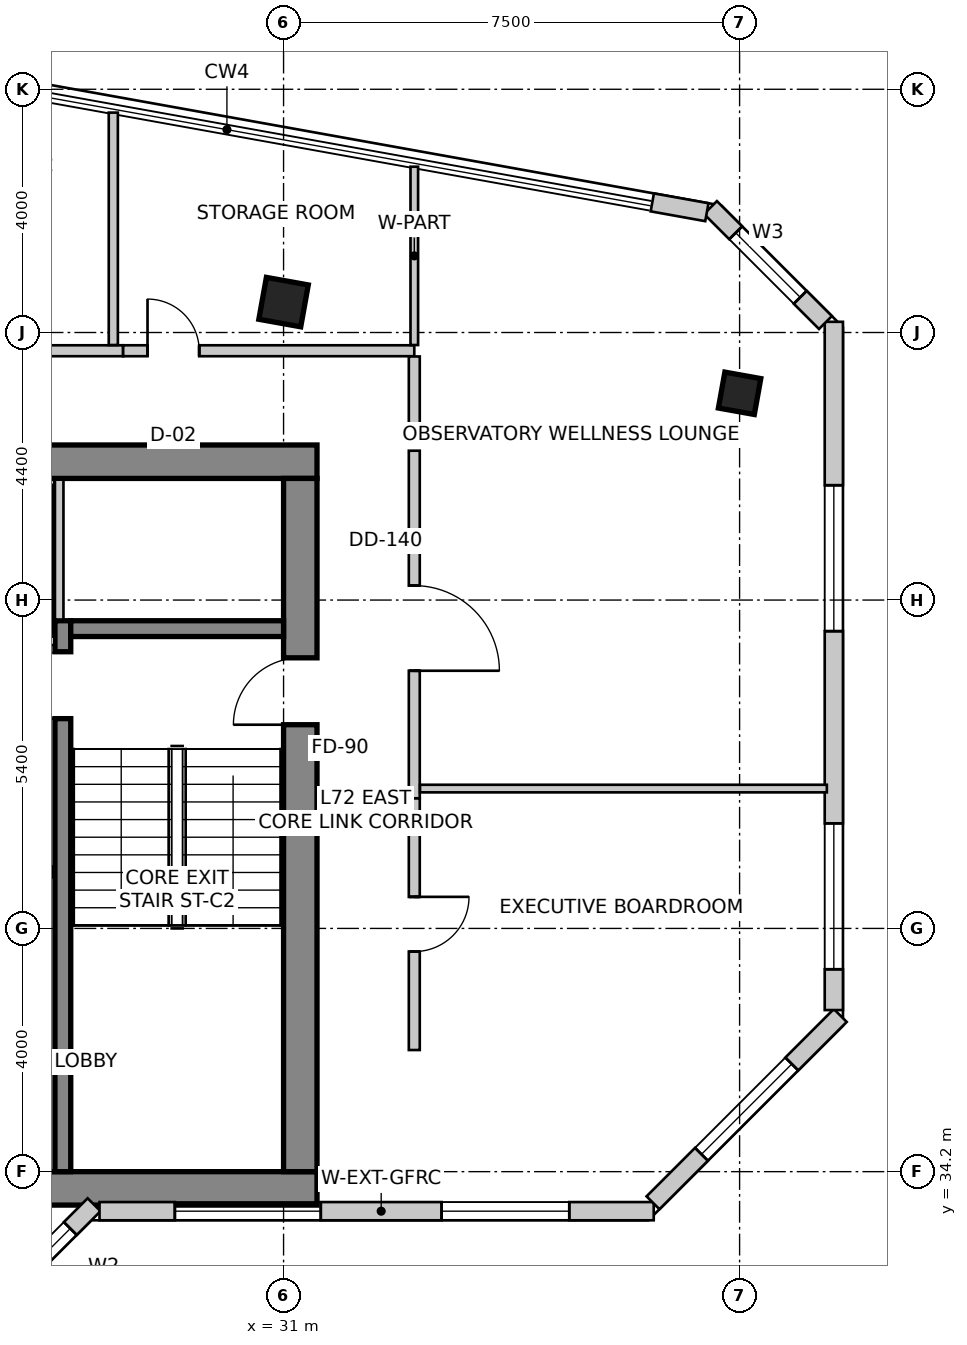
"""IFC4 building model, lengths in metres.
Left out: names, types, materials, properties, quantities, classifications, styles, units other than length and angle.
Written with IfcOpenShell. Run it as: python <this file> out.ifc"""

import sys

from ifc_helpers import new_model, si_unit, direction, frame, frame_2d, origin, origin_2d, place, context, subcontext, project, spatial, rectangle, extrude, source, transform, mapped, element, fill, save


model = new_model("IFC4")
c1 = context("Model", 3, precision=1e-05, world=origin(), true_north=direction((0.0, 1.0)))
c2 = subcontext(c1, "Body", "Model", "MODEL_VIEW")
j1 = project(units=[si_unit("LENGTHUNIT", "METRE"), si_unit("PLANEANGLEUNIT", "RADIAN")], contexts=[c1])
p1 = place(None, origin())
s1 = spatial("IfcSite", under=j1, at=p1, CompositionType="ELEMENT")
p2 = place(p1, origin())
s2 = spatial("IfcBuilding", under=s1, at=p2, CompositionType="ELEMENT")
p3 = place(p2, frame((0.0, 0.0, 281.7)))
s3 = spatial("IfcBuildingStorey", under=s2, at=p3, CompositionType="ELEMENT", Elevation=281.7)
p4 = place(p3, frame((16.05, 45.875, 0.0), z_axis=(0.0, 0.0, 1.0), x_axis=(1.0, 0.0, 0.0)))
e1 = element("IfcWall", 1, at=p4, inside=s3, PredefinedType="SHEAR", context=c2, shape_type="SweptSolid", body=[
    extrude(rectangle(XDim=15.5, YDim=0.55, at=frame_2d((7.75, 0.0))), origin(), (0.0, 0.0, 1.0), 3.6),
])
p5 = place(p3, frame((16.05, 33.925, 0.0), z_axis=(0.0, 0.0, 1.0), x_axis=(1.0, 0.0, 0.0)))
e2 = element("IfcWall", 2, at=p5, inside=s3, PredefinedType="SHEAR", context=c2, shape_type="SweptSolid", body=[
    extrude(rectangle(XDim=15.5, YDim=0.55, at=frame_2d((7.75, 0.0))), origin(), (0.0, 0.0, 1.0), 3.6),
])
m1 = source(origin(), c2, "Body", "SweptSolid", [
    extrude(rectangle(XDim=1.1, YDim=2.15, at=frame_2d((0.55, 1.075))), frame((0.0, 0.285, 0.0), z_axis=(0.0, -1.0, 0.0), x_axis=(1.0, 0.0, 0.0)), (0.0, 0.0, 1.0), 0.57),
])
p6 = place(p5, frame((9.98, 0.0, 0.0)))
e3 = element("IfcOpeningElement", 3, at=p6, cuts=e2, PredefinedType="OPENING", context=c2, shape_type="MappedRepresentation", body=[
    mapped(m1, transform((0.0, 0.0, 0.0), scale=1.0)),
])
p7 = place(p3, frame((31.275, 34.2, 0.0), z_axis=(0.0, 0.0, 1.0), x_axis=(0.0, 1.0, 0.0)))
e4 = element("IfcWall", 4, at=p7, inside=s3, PredefinedType="SHEAR", context=c2, shape_type="SweptSolid", body=[
    extrude(rectangle(XDim=11.4, YDim=0.55, at=frame_2d((5.7, 0.0))), origin(), (0.0, 0.0, 1.0), 3.6),
])
p8 = place(p7, frame((7.35, 0.0, 0.0)))
e5 = element("IfcOpeningElement", 5, at=p8, cuts=e4, PredefinedType="OPENING", context=c2, shape_type="MappedRepresentation", body=[
    mapped(m1, transform((0.0, 0.0, 0.0), scale=1.0)),
])
p9 = place(p3, frame((27.37, 34.2, 0.0), z_axis=(0.0, 0.0, 1.0), x_axis=(0.0, 1.0, 0.0)))
e6 = element("IfcWall", 6, at=p9, inside=s3, PredefinedType="SHEAR", context=c2, shape_type="SweptSolid", body=[
    extrude(rectangle(XDim=9.06, YDim=0.26, at=frame_2d((4.53, 0.0))), origin(), (0.0, 0.0, 1.0), 3.6),
])
m2 = source(origin(), c2, "Body", "SweptSolid", [
    extrude(rectangle(XDim=1.1, YDim=2.15, at=frame_2d((0.55, 1.075))), frame((0.0, 0.14, 0.0), z_axis=(0.0, -1.0, 0.0), x_axis=(1.0, 0.0, 0.0)), (0.0, 0.0, 1.0), 0.28),
])
p10 = place(p9, frame((7.45, 0.0, 0.0)))
e7 = element("IfcOpeningElement", 7, at=p10, cuts=e6, PredefinedType="OPENING", context=c2, shape_type="MappedRepresentation", body=[
    mapped(m2, transform((0.0, 0.0, 0.0), scale=1.0)),
])
p11 = place(p3, frame((27.5, 43.13, 0.0), z_axis=(0.0, 0.0, 1.0), x_axis=(1.0, 0.0, 0.0)))
e8 = element("IfcWall", 8, at=p11, inside=s3, PredefinedType="SHEAR", context=c2, shape_type="SweptSolid", body=[
    extrude(rectangle(XDim=3.5, YDim=0.26, at=frame_2d((1.75, 0.0))), origin(), (0.0, 0.0, 1.0), 3.6),
])
m3 = source(origin(), c2, "Body", "SweptSolid", [
    extrude(rectangle(XDim=0.7, YDim=0.7, at=origin_2d()), origin(), (0.0, 0.0, 1.0), 3.6),
])
p12 = place(p3, frame((31.0, 48.5, 0.0), z_axis=(0.0, 0.0, 1.0), x_axis=(0.984195607969, -0.17708474032, 0.0)))
e9 = element("IfcColumn", 9, at=p12, inside=s3, PredefinedType="COLUMN", context=c2, shape_type="MappedRepresentation", body=[
    mapped(m3, transform((0.0, 0.0, 0.0), scale=1.0)),
])
m4 = source(origin(), c2, "Body", "SweptSolid", [
    extrude(rectangle(XDim=0.6, YDim=0.6, at=origin_2d()), origin(), (0.0, 0.0, 1.0), 3.6),
])
p13 = place(p3, frame((38.5, 47.0, 0.0), z_axis=(0.0, 0.0, 1.0), x_axis=(0.984195607969, -0.17708474032, 0.0)))
e10 = element("IfcColumn", 10, at=p13, inside=s3, PredefinedType="COLUMN", context=c2, shape_type="MappedRepresentation", body=[
    mapped(m4, transform((0.0, 0.0, 0.0), scale=1.0)),
])
p14 = place(p3, frame((25.828, 31.6, 0.0), z_axis=(0.0, 0.0, 1.0), x_axis=(0.707106781187, 0.707106781187, 0.0)))
e11 = element("IfcWall", 11, at=p14, inside=s3, PredefinedType="SOLIDWALL", context=c2, shape_type="SweptSolid", body=[
    extrude(rectangle(XDim=2.907, YDim=0.3, at=frame_2d((1.454, 0.0))), origin(), (0.0, 0.0, 1.0), 3.35),
])
m5 = source(origin(), c2, "Body", "SweptSolid", [
    extrude(rectangle(XDim=1.8, YDim=2.1, at=frame_2d((0.9, 1.05))), frame((0.0, 0.16, 0.0), z_axis=(0.0, -1.0, 0.0), x_axis=(1.0, 0.0, 0.0)), (0.0, 0.0, 1.0), 0.32),
])
p15 = place(p14, frame((0.554, 0.0, 0.85)))
e12 = element("IfcOpeningElement", 12, at=p15, cuts=e11, PredefinedType="OPENING", context=c2, shape_type="MappedRepresentation", body=[
    mapped(m5, transform((0.0, 0.0, 0.0), scale=1.0)),
])
p16 = place(p3, frame((27.973, 33.55, 0.0), z_axis=(0.0, 0.0, 1.0), x_axis=(1.0, 0.0, 0.0)))
e13 = element("IfcWall", 13, at=p16, inside=s3, PredefinedType="SOLIDWALL", context=c2, shape_type="SweptSolid", body=[
    extrude(rectangle(XDim=9.115, YDim=0.3, at=frame_2d((4.558, 0.0))), origin(), (0.0, 0.0, 1.0), 3.35),
])
m6 = source(origin(), c2, "Body", "SweptSolid", [
    extrude(rectangle(XDim=2.4, YDim=2.2, at=frame_2d((1.2, 1.1))), frame((0.0, 0.16, 0.0), z_axis=(0.0, -1.0, 0.0), x_axis=(1.0, 0.0, 0.0)), (0.0, 0.0, 1.0), 0.32),
])
p17 = place(p16, frame((1.239, 0.0, 0.85)))
e14 = element("IfcOpeningElement", 14, at=p17, cuts=e13, PredefinedType="OPENING", context=c2, shape_type="MappedRepresentation", body=[
    mapped(m6, transform((0.0, 0.0, 0.0), scale=1.0)),
])
m7 = source(origin(), c2, "Body", "SweptSolid", [
    extrude(rectangle(XDim=2.1, YDim=2.0, at=frame_2d((1.05, 1.0))), frame((0.0, 0.16, 0.0), z_axis=(0.0, -1.0, 0.0), x_axis=(1.0, 0.0, 0.0)), (0.0, 0.0, 1.0), 0.32),
])
p18 = place(p16, frame((5.626, 0.0, 0.85)))
e15 = element("IfcOpeningElement", 15, at=p18, cuts=e13, PredefinedType="OPENING", context=c2, shape_type="MappedRepresentation", body=[
    mapped(m7, transform((0.0, 0.0, 0.0), scale=1.0)),
])
p19 = place(p3, frame((37.076, 33.688, 0.0), z_axis=(0.0, 0.0, 1.0), x_axis=(0.707078757535, 0.707134803727, 0.0)))
e16 = element("IfcWall", 16, at=p19, inside=s3, PredefinedType="SOLIDWALL", context=c2, shape_type="SweptSolid", body=[
    extrude(rectangle(XDim=4.356, YDim=0.3, at=frame_2d((2.178, 0.0))), origin(), (0.0, 0.0, 1.0), 3.35),
])
p20 = place(p19, frame((1.128, 0.0, 0.85)))
e17 = element("IfcOpeningElement", 17, at=p20, cuts=e16, PredefinedType="OPENING", context=c2, shape_type="MappedRepresentation", body=[
    mapped(m7, transform((0.0, 0.0, 0.0), scale=1.0)),
])
p21 = place(p3, frame((40.05, 36.857, 0.0), z_axis=(0.0, 0.0, 1.0), x_axis=(0.0, 1.0, 0.0)))
e18 = element("IfcWall", 18, at=p21, inside=s3, PredefinedType="SOLIDWALL", context=c2, shape_type="SweptSolid", body=[
    extrude(rectangle(XDim=11.318, YDim=0.3, at=frame_2d((5.659, 0.0))), origin(), (0.0, 0.0, 1.0), 3.35),
])
p22 = place(p21, frame((0.671, 0.0, 0.85)))
e19 = element("IfcOpeningElement", 19, at=p22, cuts=e18, PredefinedType="OPENING", context=c2, shape_type="MappedRepresentation", body=[
    mapped(m6, transform((0.0, 0.0, 0.0), scale=1.0)),
])
p23 = place(p21, frame((6.231, 0.0, 0.85)))
e20 = element("IfcOpeningElement", 20, at=p23, cuts=e18, PredefinedType="OPENING", context=c2, shape_type="MappedRepresentation", body=[
    mapped(m6, transform((0.0, 0.0, 0.0), scale=1.0)),
])
p24 = place(p3, frame((39.912, 48.164, 0.0), z_axis=(0.0, 0.0, 1.0), x_axis=(-0.70715242601, 0.707061133417, 0.0)))
e21 = element("IfcWall", 21, at=p24, inside=s3, PredefinedType="SOLIDWALL", context=c2, shape_type="SweptSolid", body=[
    extrude(rectangle(XDim=2.674, YDim=0.3, at=frame_2d((1.337, 0.0))), origin(), (0.0, 0.0, 1.0), 3.35),
])
m8 = source(origin(), c2, "Body", "SweptSolid", [
    extrude(rectangle(XDim=1.5, YDim=1.8, at=frame_2d((0.75, 0.9))), frame((0.0, 0.16, 0.0), z_axis=(0.0, -1.0, 0.0), x_axis=(1.0, 0.0, 0.0)), (0.0, 0.0, 1.0), 0.32),
])
p25 = place(p24, frame((0.587, 0.0, 0.85)))
e22 = element("IfcOpeningElement", 22, at=p25, cuts=e21, PredefinedType="OPENING", context=c2, shape_type="MappedRepresentation", body=[
    mapped(m8, transform((0.0, 0.0, 0.0), scale=1.0)),
])
p26 = place(p3, frame((37.962, 49.979, 0.0), z_axis=(0.0, 0.0, 1.0), x_axis=(-0.984215051171, 0.176976645491, 0.0)))
e23 = element("IfcWall", 23, at=p26, inside=s3, PredefinedType="SOLIDWALL", context=c2, shape_type="SweptSolid", body=[
    extrude(rectangle(XDim=0.912, YDim=0.3, at=frame_2d((0.456, 0.0))), origin(), (0.0, 0.0, 1.0), 3.35),
])
p27 = place(p3, frame((20.37, 42.93, 0.0), z_axis=(0.0, 0.0, 1.0), x_axis=(1.0, 0.0, 0.0)))
e24 = element("IfcWall", 24, at=p27, inside=s3, PredefinedType="SOLIDWALL", context=c2, shape_type="SweptSolid", body=[
    extrude(rectangle(XDim=6.86, YDim=0.14, at=frame_2d((3.43, 0.0))), origin(), (0.0, 0.0, 1.0), 3.35),
])
m9 = source(origin(), c2, "Body", "SweptSolid", [
    extrude(rectangle(XDim=1.1, YDim=2.15, at=frame_2d((0.55, 1.075))), frame((0.0, 0.08, 0.0), z_axis=(0.0, -1.0, 0.0), x_axis=(1.0, 0.0, 0.0)), (0.0, 0.0, 1.0), 0.16),
])
p28 = place(p27, frame((0.5, 0.0, 0.0)))
e25 = element("IfcOpeningElement", 25, at=p28, cuts=e24, PredefinedType="OPENING", context=c2, shape_type="MappedRepresentation", body=[
    mapped(m9, transform((0.0, 0.0, 0.0), scale=1.0)),
])
p29 = place(p27, frame((2.7, 0.0, 0.0)))
e26 = element("IfcOpeningElement", 26, at=p29, cuts=e24, PredefinedType="OPENING", context=c2, shape_type="MappedRepresentation", body=[
    mapped(m9, transform((0.0, 0.0, 0.0), scale=1.0)),
])
p30 = place(p27, frame((5.1, 0.0, 0.0)))
e27 = element("IfcOpeningElement", 27, at=p30, cuts=e24, PredefinedType="OPENING", context=c2, shape_type="MappedRepresentation", body=[
    mapped(m9, transform((0.0, 0.0, 0.0), scale=1.0)),
])
p31 = place(p3, frame((27.31, 43.28, 0.0), z_axis=(0.0, 0.0, 1.0), x_axis=(0.0, 1.0, 0.0)))
e28 = element("IfcWall", 28, at=p31, inside=s3, PredefinedType="SOLIDWALL", context=c2, shape_type="SweptSolid", body=[
    extrude(rectangle(XDim=2.3, YDim=0.14, at=frame_2d((1.15, 0.0))), origin(), (0.0, 0.0, 1.0), 3.35),
])
p32 = place(p3, frame((24.162, 47.7, 0.0), z_axis=(0.0, 0.0, 1.0), x_axis=(1.0, 0.0, 0.0)))
e29 = element("IfcWall", 29, at=p32, inside=s3, PredefinedType="PARTITIONING", context=c2, shape_type="SweptSolid", body=[
    extrude(rectangle(XDim=4.198, YDim=0.18, at=frame_2d((2.099, 0.0))), origin(), (0.0, 0.0, 1.0), 3.35),
])
m10 = source(origin(), c2, "Body", "SweptSolid", [
    extrude(rectangle(XDim=0.85, YDim=2.15, at=frame_2d((0.425, 1.075))), frame((0.0, 0.1, 0.0), z_axis=(0.0, -1.0, 0.0), x_axis=(1.0, 0.0, 0.0)), (0.0, 0.0, 1.0), 0.2),
])
p33 = place(p32, frame((1.613, 0.0, 0.0)))
e30 = element("IfcOpeningElement", 30, at=p33, cuts=e29, PredefinedType="OPENING", context=c2, shape_type="MappedRepresentation", body=[
    mapped(m10, transform((0.0, 0.0, 0.0), scale=1.0)),
])
p34 = place(p3, frame((28.362, 47.7, 0.0), z_axis=(0.0, 0.0, 1.0), x_axis=(1.0, 0.0, 0.0)))
e31 = element("IfcWall", 31, at=p34, inside=s3, PredefinedType="PARTITIONING", context=c2, shape_type="SweptSolid", body=[
    extrude(rectangle(XDim=4.788, YDim=0.18, at=frame_2d((2.394, 0.0))), origin(), (0.0, 0.0, 1.0), 2.788),
])
p35 = place(p34, frame((0.401, 0.0, 0.0)))
e32 = element("IfcOpeningElement", 32, at=p35, cuts=e31, PredefinedType="OPENING", context=c2, shape_type="MappedRepresentation", body=[
    mapped(m10, transform((0.0, 0.0, 0.0), scale=1.0)),
])
p36 = place(p3, frame((33.15, 47.606, 0.0), z_axis=(0.0, 0.0, 1.0), x_axis=(0.0, -1.0, 0.0)))
e33 = element("IfcWall", 33, at=p36, inside=s3, PredefinedType="PARTITIONING", context=c2, shape_type="SweptSolid", body=[
    extrude(rectangle(XDim=1.456, YDim=0.18, at=frame_2d((0.728, 0.0))), origin(), (0.0, 0.0, 1.0), 3.35),
])
p37 = place(p3, frame((33.15, 46.056, 0.0), z_axis=(0.0, 0.0, 1.0), x_axis=(0.0, -1.0, 0.0)))
e34 = element("IfcWall", 34, at=p37, inside=s3, PredefinedType="PARTITIONING", context=c2, shape_type="SweptSolid", body=[
    extrude(rectangle(XDim=5.716, YDim=0.18, at=frame_2d((2.858, 0.0))), origin(), (0.0, 0.0, 1.0), 2.788),
])
m11 = source(origin(), c2, "Body", "SweptSolid", [
    extrude(rectangle(XDim=1.4, YDim=2.15, at=frame_2d((0.7, 1.075))), frame((0.0, 0.1, 0.0), z_axis=(0.0, -1.0, 0.0), x_axis=(1.0, 0.0, 0.0)), (0.0, 0.0, 1.0), 0.2),
])
p38 = place(p37, frame((2.219, 0.0, 0.0)))
e35 = element("IfcOpeningElement", 35, at=p38, cuts=e34, PredefinedType="OPENING", context=c2, shape_type="MappedRepresentation", body=[
    mapped(m11, transform((0.0, 0.0, 0.0), scale=1.0)),
])
p39 = place(p3, frame((33.15, 40.338, 0.0), z_axis=(0.0, 0.0, 1.0), x_axis=(0.0, -1.0, 0.0)))
e36 = element("IfcWall", 36, at=p39, inside=s3, PredefinedType="PARTITIONING", context=c2, shape_type="SweptSolid", body=[
    extrude(rectangle(XDim=4.138, YDim=0.18, at=frame_2d((2.069, 0.0))), origin(), (0.0, 0.0, 1.0), 3.35),
])
m12 = source(origin(), c2, "Body", "SweptSolid", [
    extrude(rectangle(XDim=0.9, YDim=2.15, at=frame_2d((0.45, 1.075))), frame((0.0, 0.1, 0.0), z_axis=(0.0, -1.0, 0.0), x_axis=(1.0, 0.0, 0.0)), (0.0, 0.0, 1.0), 0.2),
])
p40 = place(p39, frame((1.619, 0.0, 0.0)))
e37 = element("IfcOpeningElement", 37, at=p40, cuts=e36, PredefinedType="OPENING", context=c2, shape_type="MappedRepresentation", body=[
    mapped(m12, transform((0.0, 0.0, 0.0), scale=1.0)),
])
p41 = place(p3, frame((28.2, 51.616, 0.0), z_axis=(0.0, 0.0, 1.0), x_axis=(0.0, -1.0, 0.0)))
e38 = element("IfcWall", 38, at=p41, inside=s3, PredefinedType="PARTITIONING", context=c2, shape_type="SweptSolid", body=[
    extrude(rectangle(XDim=3.822, YDim=0.15, at=frame_2d((1.911, 0.0))), origin(), (0.0, 0.0, 1.0), 2.642),
])
p42 = place(p3, frame((33.15, 50.727, 0.0), z_axis=(0.0, 0.0, 1.0), x_axis=(0.0, -1.0, 0.0)))
e39 = element("IfcWall", 39, at=p42, inside=s3, PredefinedType="PARTITIONING", context=c2, shape_type="SweptSolid", body=[
    extrude(rectangle(XDim=2.933, YDim=0.125, at=frame_2d((1.466, 0.0))), origin(), (0.0, 0.0, 1.0), 2.642),
])
p43 = place(p3, frame((39.935, 40.5, 0.0), z_axis=(0.0, 0.0, 1.0), x_axis=(-1.0, 0.0, 0.0)))
e40 = element("IfcWall", 40, at=p43, inside=s3, PredefinedType="PARTITIONING", context=c2, shape_type="SweptSolid", body=[
    extrude(rectangle(XDim=6.691, YDim=0.125, at=frame_2d((3.346, 0.0))), origin(), (0.0, 0.0, 1.0), 3.35),
])
m13 = source(origin(), c2, "Body", "SweptSolid", [
    extrude(rectangle(XDim=1.8, YDim=2.1, at=frame_2d((0.9, 1.05))), frame((0.0, -0.015, 0.0), z_axis=(0.0, -1.0, 0.0), x_axis=(1.0, 0.0, 0.0)), (0.0, 0.0, 1.0), 0.06),
])
p44 = place(p15, origin())
e41 = element("IfcWindow", 41, at=p44, inside=s3, PartitioningType="SINGLE_PANEL", PredefinedType="WINDOW", context=c2, shape_type="MappedRepresentation", body=[
    mapped(m13, transform((0.0, 0.0, 0.0), scale=1.0)),
])
fill(e12, e41)
m14 = source(origin(), c2, "Body", "SweptSolid", [
    extrude(rectangle(XDim=2.4, YDim=2.2, at=frame_2d((1.2, 1.1))), frame((0.0, -0.015, 0.0), z_axis=(0.0, -1.0, 0.0), x_axis=(1.0, 0.0, 0.0)), (0.0, 0.0, 1.0), 0.06),
])
p45 = place(p17, origin())
e42 = element("IfcWindow", 42, at=p45, inside=s3, PartitioningType="SINGLE_PANEL", PredefinedType="WINDOW", context=c2, shape_type="MappedRepresentation", body=[
    mapped(m14, transform((0.0, 0.0, 0.0), scale=1.0)),
])
fill(e14, e42)
m15 = source(origin(), c2, "Body", "SweptSolid", [
    extrude(rectangle(XDim=2.1, YDim=2.0, at=frame_2d((1.05, 1.0))), frame((0.0, -0.015, 0.0), z_axis=(0.0, -1.0, 0.0), x_axis=(1.0, 0.0, 0.0)), (0.0, 0.0, 1.0), 0.06),
])
p46 = place(p18, origin())
e43 = element("IfcWindow", 43, at=p46, inside=s3, PartitioningType="SINGLE_PANEL", PredefinedType="WINDOW", context=c2, shape_type="MappedRepresentation", body=[
    mapped(m15, transform((0.0, 0.0, 0.0), scale=1.0)),
])
fill(e15, e43)
p47 = place(p20, origin())
e44 = element("IfcWindow", 44, at=p47, inside=s3, PartitioningType="SINGLE_PANEL", PredefinedType="WINDOW", context=c2, shape_type="MappedRepresentation", body=[
    mapped(m15, transform((0.0, 0.0, 0.0), scale=1.0)),
])
fill(e17, e44)
p48 = place(p22, origin())
e45 = element("IfcWindow", 45, at=p48, inside=s3, PartitioningType="SINGLE_PANEL", PredefinedType="WINDOW", context=c2, shape_type="MappedRepresentation", body=[
    mapped(m14, transform((0.0, 0.0, 0.0), scale=1.0)),
])
fill(e19, e45)
p49 = place(p23, origin())
e46 = element("IfcWindow", 46, at=p49, inside=s3, PartitioningType="SINGLE_PANEL", PredefinedType="WINDOW", context=c2, shape_type="MappedRepresentation", body=[
    mapped(m14, transform((0.0, 0.0, 0.0), scale=1.0)),
])
fill(e20, e46)
m16 = source(origin(), c2, "Body", "SweptSolid", [
    extrude(rectangle(XDim=1.5, YDim=1.8, at=frame_2d((0.75, 0.9))), frame((0.0, -0.015, 0.0), z_axis=(0.0, -1.0, 0.0), x_axis=(1.0, 0.0, 0.0)), (0.0, 0.0, 1.0), 0.06),
])
p50 = place(p25, origin())
e47 = element("IfcWindow", 47, at=p50, inside=s3, PartitioningType="SINGLE_PANEL", PredefinedType="WINDOW", context=c2, shape_type="MappedRepresentation", body=[
    mapped(m16, transform((0.0, 0.0, 0.0), scale=1.0)),
])
fill(e22, e47)
m17 = source(origin(), c2, "Body", "SweptSolid", [
    extrude(rectangle(XDim=1.1, YDim=2.15, at=frame_2d((0.55, 1.075))), frame((0.0, 0.025, 0.0), z_axis=(0.0, -1.0, 0.0), x_axis=(1.0, 0.0, 0.0)), (0.0, 0.0, 1.0), 0.05),
])
p51 = place(p10, origin())
e48 = element("IfcDoor", 48, at=p51, inside=s3, OperationType="SINGLE_SWING_LEFT", PredefinedType="DOOR", context=c2, shape_type="MappedRepresentation", body=[
    mapped(m17, transform((0.0, 0.0, 0.0), scale=1.0)),
])
fill(e7, e48)
p52 = place(p8, origin())
e49 = element("IfcDoor", 49, at=p52, inside=s3, OperationType="SINGLE_SWING_LEFT", PredefinedType="DOOR", context=c2, shape_type="MappedRepresentation", body=[
    mapped(m17, transform((0.0, 0.0, 0.0), scale=1.0)),
])
fill(e5, e49)
m18 = source(origin(), c2, "Body", "SweptSolid", [
    extrude(rectangle(XDim=0.85, YDim=2.15, at=frame_2d((0.425, 1.075))), frame((0.0, 0.025, 0.0), z_axis=(0.0, -1.0, 0.0), x_axis=(1.0, 0.0, 0.0)), (0.0, 0.0, 1.0), 0.05),
])
p53 = place(p35, origin())
e50 = element("IfcDoor", 50, at=p53, inside=s3, OperationType="SINGLE_SWING_LEFT", PredefinedType="DOOR", context=c2, shape_type="MappedRepresentation", body=[
    mapped(m18, transform((0.0, 0.0, 0.0), scale=1.0)),
])
fill(e32, e50)
m19 = source(origin(), c2, "Body", "SweptSolid", [
    extrude(rectangle(XDim=1.4, YDim=2.15, at=frame_2d((0.7, 1.075))), frame((0.0, 0.025, 0.0), z_axis=(0.0, -1.0, 0.0), x_axis=(1.0, 0.0, 0.0)), (0.0, 0.0, 1.0), 0.05),
])
p54 = place(p38, origin())
e51 = element("IfcDoor", 51, at=p54, inside=s3, OperationType="SINGLE_SWING_RIGHT", PredefinedType="DOOR", context=c2, shape_type="MappedRepresentation", body=[
    mapped(m19, transform((0.0, 0.0, 0.0), scale=1.0)),
])
fill(e35, e51)
m20 = source(origin(), c2, "Body", "SweptSolid", [
    extrude(rectangle(XDim=0.9, YDim=2.15, at=frame_2d((0.45, 1.075))), frame((0.0, 0.025, 0.0), z_axis=(0.0, -1.0, 0.0), x_axis=(1.0, 0.0, 0.0)), (0.0, 0.0, 1.0), 0.05),
])
p55 = place(p40, origin())
e52 = element("IfcDoor", 52, at=p55, inside=s3, OperationType="SINGLE_SWING_LEFT", PredefinedType="DOOR", context=c2, shape_type="MappedRepresentation", body=[
    mapped(m20, transform((0.0, 0.0, 0.0), scale=1.0)),
])
fill(e37, e52)
save(model, sys.argv[1])
